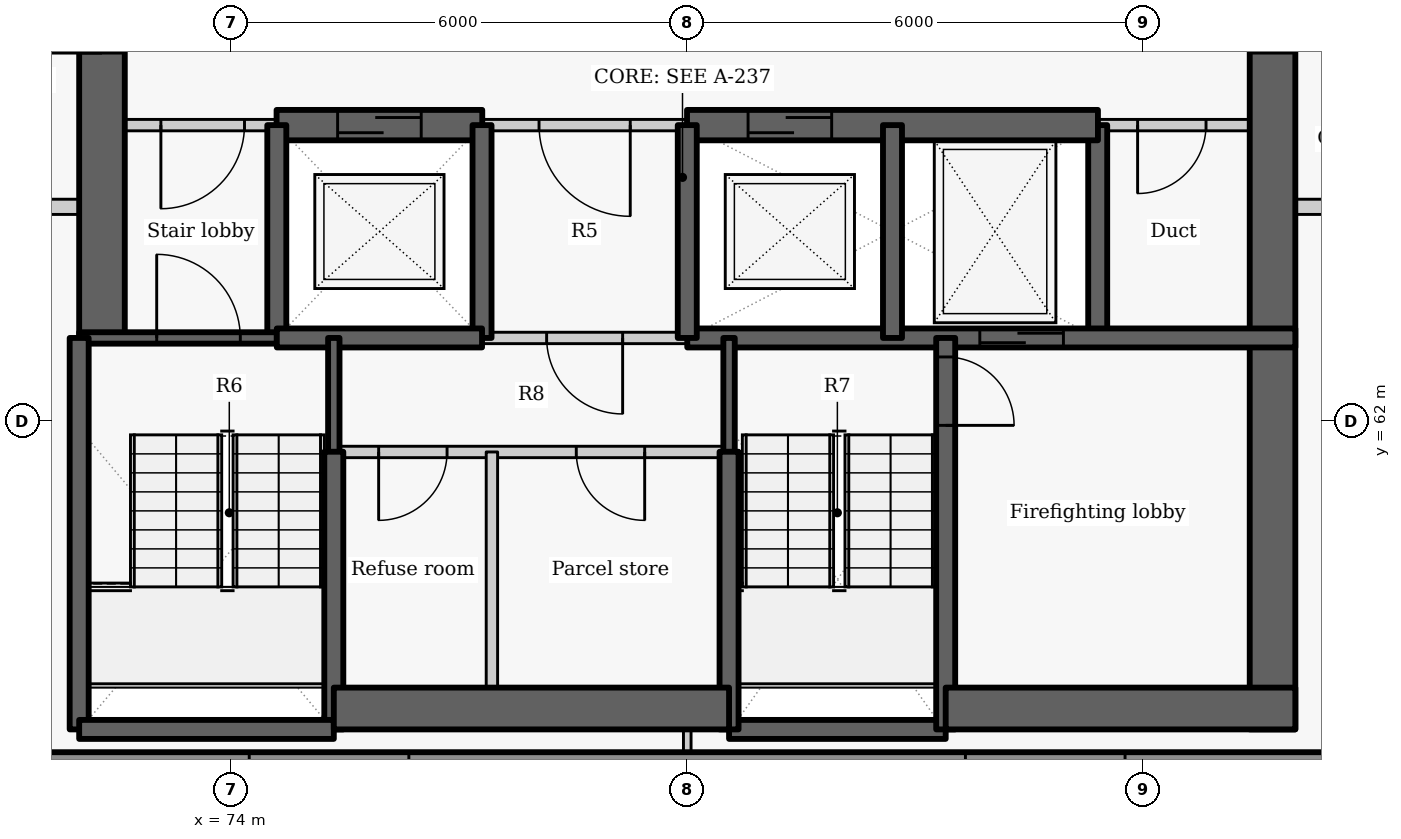
"""IFC4 building model, lengths in metres.
Left out: names, types, materials, properties, quantities, classifications, styles, units other than length and angle.
Written with IfcOpenShell. Run it as: python <this file> out.ifc"""

import sys

from ifc_helpers import new_model, si_unit, direction, frame, frame_2d, origin, place, context, subcontext, project, spatial, rectangle, extrude, element, fill, save


model = new_model("IFC4")
c1 = context("Model", 3, precision=1e-05, world=origin(), true_north=direction((0.0, 1.0)))
c2 = subcontext(c1, "Body", "Model", "MODEL_VIEW")
j1 = project(units=[si_unit("LENGTHUNIT", "METRE"), si_unit("PLANEANGLEUNIT", "RADIAN")], contexts=[c1])
p1 = place(None, origin())
s1 = spatial("IfcSite", under=j1, at=p1, CompositionType="ELEMENT")
p2 = place(p1, origin())
s2 = spatial("IfcBuilding", under=s1, at=p2, CompositionType="ELEMENT")
p3 = place(p2, frame((0.0, 0.0, 216.3)))
s3 = spatial("IfcBuildingStorey", under=s2, at=p3, CompositionType="ELEMENT", Elevation=216.3)
p4 = place(p3, frame((70.551, 57.5, 0.0), z_axis=(0.0, 0.0, 1.0), x_axis=(1.0, 0.0, 0.0)))
e1 = element("IfcWall", 1, at=p4, inside=s3, PredefinedType="SOLIDWALL", context=c2, shape_type="SweptSolid", body=[
    extrude(rectangle(XDim=18.893, YDim=0.3, at=frame_2d((9.446, 0.0))), origin(), (0.0, 0.0, 1.0), 2.05),
])
p5 = place(p4, frame((3.687, 0.0, 0.9)))
e2 = element("IfcOpeningElement", 2, at=p5, cuts=e1, PredefinedType="OPENING", context=c2, shape_type="SweptSolid", body=[
    extrude(rectangle(XDim=2.1, YDim=1.1, at=frame_2d((1.05, 0.55))), frame((0.0, 0.16, 0.0), z_axis=(0.0, -1.0, 0.0), x_axis=(1.0, 0.0, 0.0)), (0.0, 0.0, 1.0), 0.32),
])
p6 = place(p4, frame((13.109, 0.0, 0.9)))
e3 = element("IfcOpeningElement", 3, at=p6, cuts=e1, PredefinedType="OPENING", context=c2, shape_type="SweptSolid", body=[
    extrude(rectangle(XDim=2.1, YDim=1.1, at=frame_2d((1.05, 0.55))), frame((0.0, 0.16, 0.0), z_axis=(0.0, -1.0, 0.0), x_axis=(1.0, 0.0, 0.0)), (0.0, 0.0, 1.0), 0.32),
])
p7 = place(p3, frame((72.3, 63.1, -0.275), z_axis=(0.0, 0.0, 1.0), x_axis=(0.0, 1.0, 0.0)))
e4 = element("IfcWall", 4, at=p7, inside=s3, PredefinedType="SHEAR", context=c2, shape_type="SweptSolid", body=[
    extrude(rectangle(XDim=9.1, YDim=0.6, at=frame_2d((4.55, 0.0))), origin(), (0.0, 0.0, 1.0), 3.225),
])
p8 = place(p7, frame((3.748, 0.0, 0.275)))
e5 = element("IfcOpeningElement", 5, at=p8, cuts=e4, PredefinedType="OPENING", context=c2, shape_type="SweptSolid", body=[
    extrude(rectangle(XDim=1.5, YDim=2.1, at=frame_2d((0.75, 1.05))), frame((0.0, 0.31, 0.0), z_axis=(0.0, -1.0, 0.0), x_axis=(1.0, 0.0, 0.0)), (0.0, 0.0, 1.0), 0.62),
])
p9 = place(p3, frame((85.4, 63.1, -0.275), z_axis=(0.0, 0.0, 1.0), x_axis=(0.0, 1.0, 0.0)))
e6 = element("IfcWall", 6, at=p9, inside=s3, PredefinedType="SHEAR", context=c2, shape_type="SweptSolid", body=[
    extrude(rectangle(XDim=2.8, YDim=0.25, at=frame_2d((1.4, 0.0))), origin(), (0.0, 0.0, 1.0), 3.225),
])
p10 = place(p3, frame((87.7, 72.2, -0.275), z_axis=(0.0, 0.0, 1.0), x_axis=(0.0, -1.0, 0.0)))
e7 = element("IfcWall", 7, at=p10, inside=s3, PredefinedType="SHEAR", context=c2, shape_type="SweptSolid", body=[
    extrude(rectangle(XDim=14.25, YDim=0.6, at=frame_2d((7.125, 0.0))), origin(), (0.0, 0.0, 1.0), 3.225),
])
p11 = place(p10, frame((3.852, 0.0, 0.275)))
e8 = element("IfcOpeningElement", 8, at=p11, cuts=e7, PredefinedType="OPENING", context=c2, shape_type="SweptSolid", body=[
    extrude(rectangle(XDim=1.5, YDim=2.1, at=frame_2d((0.75, 1.05))), frame((0.0, 0.31, 0.0), z_axis=(0.0, -1.0, 0.0), x_axis=(1.0, 0.0, 0.0)), (0.0, 0.0, 1.0), 0.62),
])
p12 = place(p3, frame((74.603, 65.9, 0.0), z_axis=(0.0, 0.0, 1.0), x_axis=(-1.0, 0.0, 0.0)))
e9 = element("IfcWall", 9, at=p12, inside=s3, PredefinedType="PARTITIONING", context=c2, shape_type="SweptSolid", body=[
    extrude(rectangle(XDim=2.603, YDim=0.15, at=frame_2d((1.302, 0.0))), origin(), (0.0, 0.0, 1.0), 2.95),
])
p13 = place(p12, frame((0.428, 0.0, 0.0)))
e10 = element("IfcOpeningElement", 10, at=p13, cuts=e9, PredefinedType="OPENING", context=c2, shape_type="SweptSolid", body=[
    extrude(rectangle(XDim=1.1, YDim=2.1, at=frame_2d((0.55, 1.05))), frame((0.0, 0.085, 0.0), z_axis=(0.0, -1.0, 0.0), x_axis=(1.0, 0.0, 0.0)), (0.0, 0.0, 1.0), 0.17),
])
p14 = place(p3, frame((80.003, 65.9, 0.0), z_axis=(0.0, 0.0, 1.0), x_axis=(-1.0, 0.0, 0.0)))
e11 = element("IfcWall", 11, at=p14, inside=s3, PredefinedType="PARTITIONING", context=c2, shape_type="SweptSolid", body=[
    extrude(rectangle(XDim=2.706, YDim=0.15, at=frame_2d((1.353, 0.0))), origin(), (0.0, 0.0, 1.0), 2.95),
])
p15 = place(p14, frame((0.753, 0.0, 0.0)))
e12 = element("IfcOpeningElement", 12, at=p15, cuts=e11, PredefinedType="OPENING", context=c2, shape_type="SweptSolid", body=[
    extrude(rectangle(XDim=1.2, YDim=2.1, at=frame_2d((0.6, 1.05))), frame((0.0, 0.085, 0.0), z_axis=(0.0, -1.0, 0.0), x_axis=(1.0, 0.0, 0.0)), (0.0, 0.0, 1.0), 0.17),
])
p16 = place(p3, frame((88.0, 65.9, 0.0), z_axis=(0.0, 0.0, 1.0), x_axis=(-1.0, 0.0, 0.0)))
e13 = element("IfcWall", 13, at=p16, inside=s3, PredefinedType="PARTITIONING", context=c2, shape_type="SweptSolid", body=[
    extrude(rectangle(XDim=2.603, YDim=0.15, at=frame_2d((1.302, 0.0))), origin(), (0.0, 0.0, 1.0), 2.95),
])
p17 = place(p16, frame((1.175, 0.0, 0.0)))
e14 = element("IfcOpeningElement", 14, at=p17, cuts=e13, PredefinedType="OPENING", context=c2, shape_type="SweptSolid", body=[
    extrude(rectangle(XDim=0.9, YDim=2.1, at=frame_2d((0.45, 1.05))), frame((0.0, 0.085, 0.0), z_axis=(0.0, -1.0, 0.0), x_axis=(1.0, 0.0, 0.0)), (0.0, 0.0, 1.0), 0.17),
])
p18 = place(p3, frame((74.597, 65.9, -0.275), z_axis=(0.0, 0.0, 1.0), x_axis=(1.0, 0.0, 0.0)))
e15 = element("IfcWall", 15, at=p18, inside=s3, PredefinedType="SHEAR", context=c2, shape_type="SweptSolid", body=[
    extrude(rectangle(XDim=2.706, YDim=0.4, at=frame_2d((1.353, 0.0))), origin(), (0.0, 0.0, 1.0), 3.225),
])
p19 = place(p18, frame((0.803, 0.0, 0.275)))
e16 = element("IfcOpeningElement", 16, at=p19, cuts=e15, PredefinedType="OPENING", context=c2, shape_type="SweptSolid", body=[
    extrude(rectangle(XDim=1.1, YDim=2.1, at=frame_2d((0.55, 1.05))), frame((0.0, 0.21, 0.0), z_axis=(0.0, -1.0, 0.0), x_axis=(1.0, 0.0, 0.0)), (0.0, 0.0, 1.0), 0.42),
])
p20 = place(p3, frame((79.997, 65.9, -0.275), z_axis=(0.0, 0.0, 1.0), x_axis=(1.0, 0.0, 0.0)))
e17 = element("IfcWall", 17, at=p20, inside=s3, PredefinedType="SHEAR", context=c2, shape_type="SweptSolid", body=[
    extrude(rectangle(XDim=5.406, YDim=0.4, at=frame_2d((2.703, 0.0))), origin(), (0.0, 0.0, 1.0), 3.225),
])
p21 = place(p20, frame((0.803, 0.0, 0.275)))
e18 = element("IfcOpeningElement", 18, at=p21, cuts=e17, PredefinedType="OPENING", context=c2, shape_type="SweptSolid", body=[
    extrude(rectangle(XDim=1.1, YDim=2.1, at=frame_2d((0.55, 1.05))), frame((0.0, 0.21, 0.0), z_axis=(0.0, -1.0, 0.0), x_axis=(1.0, 0.0, 0.0)), (0.0, 0.0, 1.0), 0.42),
])
p22 = place(p3, frame((74.6, 63.1, -0.275), z_axis=(0.0, 0.0, 1.0), x_axis=(0.0, 1.0, 0.0)))
e19 = element("IfcWall", 19, at=p22, inside=s3, PredefinedType="SHEAR", context=c2, shape_type="SweptSolid", body=[
    extrude(rectangle(XDim=2.8, YDim=0.25, at=frame_2d((1.4, 0.0))), origin(), (0.0, 0.0, 1.0), 3.225),
])
p23 = place(p3, frame((72.0, 63.1, -0.275), z_axis=(0.0, 0.0, 1.0), x_axis=(1.0, 0.0, 0.0)))
e20 = element("IfcWall", 20, at=p23, inside=s3, PredefinedType="SHEAR", context=c2, shape_type="SweptSolid", body=[
    extrude(rectangle(XDim=2.6, YDim=0.15, at=frame_2d((1.3, 0.0))), origin(), (0.0, 0.0, 1.0), 3.225),
])
p24 = place(p23, frame((1.02, 0.0, 0.275)))
e21 = element("IfcOpeningElement", 21, at=p24, cuts=e20, PredefinedType="OPENING", context=c2, shape_type="SweptSolid", body=[
    extrude(rectangle(XDim=1.1, YDim=2.1, at=frame_2d((0.55, 1.05))), frame((0.0, 0.085, 0.0), z_axis=(0.0, -1.0, 0.0), x_axis=(1.0, 0.0, 0.0)), (0.0, 0.0, 1.0), 0.17),
])
p25 = place(p3, frame((77.3, 63.1, -0.275), z_axis=(0.0, 0.0, 1.0), x_axis=(0.0, 1.0, 0.0)))
e22 = element("IfcWall", 22, at=p25, inside=s3, PredefinedType="SHEAR", context=c2, shape_type="SweptSolid", body=[
    extrude(rectangle(XDim=2.8, YDim=0.25, at=frame_2d((1.4, 0.0))), origin(), (0.0, 0.0, 1.0), 3.225),
])
p26 = place(p3, frame((74.6, 63.1, -0.275), z_axis=(0.0, 0.0, 1.0), x_axis=(1.0, 0.0, 0.0)))
e23 = element("IfcWall", 23, at=p26, inside=s3, PredefinedType="SHEAR", context=c2, shape_type="SweptSolid", body=[
    extrude(rectangle(XDim=2.7, YDim=0.25, at=frame_2d((1.35, 0.0))), origin(), (0.0, 0.0, 1.0), 3.225),
])
p27 = place(p3, frame((80.0, 63.1, -0.275), z_axis=(0.0, 0.0, 1.0), x_axis=(1.0, 0.0, 0.0)))
e24 = element("IfcWall", 24, at=p27, inside=s3, PredefinedType="SHEAR", context=c2, shape_type="SweptSolid", body=[
    extrude(rectangle(XDim=8.0, YDim=0.25, at=frame_2d((4.0, 0.0))), origin(), (0.0, 0.0, 1.0), 3.225),
])
p28 = place(p27, frame((3.849, 0.0, 0.275)))
e25 = element("IfcOpeningElement", 25, at=p28, cuts=e24, PredefinedType="OPENING", context=c2, shape_type="SweptSolid", body=[
    extrude(rectangle(XDim=1.1, YDim=2.1, at=frame_2d((0.55, 1.05))), frame((0.0, 0.135, 0.0), z_axis=(0.0, -1.0, 0.0), x_axis=(1.0, 0.0, 0.0)), (0.0, 0.0, 1.0), 0.27),
])
p29 = place(p3, frame((80.0, 63.1, -0.275), z_axis=(0.0, 0.0, 1.0), x_axis=(0.0, 1.0, 0.0)))
e26 = element("IfcWall", 26, at=p29, inside=s3, PredefinedType="SHEAR", context=c2, shape_type="SweptSolid", body=[
    extrude(rectangle(XDim=2.8, YDim=0.25, at=frame_2d((1.4, 0.0))), origin(), (0.0, 0.0, 1.0), 3.225),
])
p30 = place(p3, frame((80.0, 63.1, 0.0), z_axis=(0.0, 0.0, 1.0), x_axis=(-1.0, 0.0, 0.0)))
e27 = element("IfcWall", 27, at=p30, inside=s3, PredefinedType="PARTITIONING", context=c2, shape_type="SweptSolid", body=[
    extrude(rectangle(XDim=2.7, YDim=0.15, at=frame_2d((1.35, 0.0))), origin(), (0.0, 0.0, 1.0), 2.95),
])
p31 = place(p30, frame((0.85, 0.0, 0.0)))
e28 = element("IfcOpeningElement", 28, at=p31, cuts=e27, PredefinedType="OPENING", context=c2, shape_type="SweptSolid", body=[
    extrude(rectangle(XDim=1.0, YDim=2.1, at=frame_2d((0.5, 1.05))), frame((0.0, 0.085, 0.0), z_axis=(0.0, -1.0, 0.0), x_axis=(1.0, 0.0, 0.0)), (0.0, 0.0, 1.0), 0.17),
])
p32 = place(p3, frame((82.7, 63.1, -0.275), z_axis=(0.0, 0.0, 1.0), x_axis=(0.0, 1.0, 0.0)))
e29 = element("IfcWall", 29, at=p32, inside=s3, PredefinedType="SHEAR", context=c2, shape_type="SweptSolid", body=[
    extrude(rectangle(XDim=2.8, YDim=0.25, at=frame_2d((1.4, 0.0))), origin(), (0.0, 0.0, 1.0), 3.225),
])
p33 = place(p3, frame((75.35, 61.597, -0.275), z_axis=(0.0, 0.0, 1.0), x_axis=(0.0, 1.0, 0.0)))
e30 = element("IfcWall", 30, at=p33, inside=s3, PredefinedType="SHEAR", context=c2, shape_type="SweptSolid", body=[
    extrude(rectangle(XDim=1.503, YDim=0.15, at=frame_2d((0.751, 0.0))), origin(), (0.0, 0.0, 1.0), 3.225),
])
p34 = place(p3, frame((75.35, 57.95, -0.275), z_axis=(0.0, 0.0, 1.0), x_axis=(0.0, 1.0, 0.0)))
e31 = element("IfcWall", 31, at=p34, inside=s3, PredefinedType="SHEAR", context=c2, shape_type="SweptSolid", body=[
    extrude(rectangle(XDim=3.653, YDim=0.25, at=frame_2d((1.827, 0.0))), origin(), (0.0, 0.0, 1.0), 3.225),
])
p35 = place(p3, frame((72.0, 57.95, -0.275), z_axis=(0.0, 0.0, 1.0), x_axis=(0.0, 1.0, 0.0)))
e32 = element("IfcWall", 32, at=p35, inside=s3, PredefinedType="SHEAR", context=c2, shape_type="SweptSolid", body=[
    extrude(rectangle(XDim=5.15, YDim=0.25, at=frame_2d((2.575, 0.0))), origin(), (0.0, 0.0, 1.0), 3.225),
])
p36 = place(p3, frame((72.0, 57.95, -0.275), z_axis=(0.0, 0.0, 1.0), x_axis=(1.0, 0.0, 0.0)))
e33 = element("IfcWall", 33, at=p36, inside=s3, PredefinedType="SHEAR", context=c2, shape_type="SweptSolid", body=[
    extrude(rectangle(XDim=3.35, YDim=0.25, at=frame_2d((1.675, 0.0))), origin(), (0.0, 0.0, 1.0), 3.225),
])
p37 = place(p3, frame((80.55, 57.95, -0.275), z_axis=(0.0, 0.0, 1.0), x_axis=(1.0, 0.0, 0.0)))
e34 = element("IfcWall", 34, at=p37, inside=s3, PredefinedType="SHEAR", context=c2, shape_type="SweptSolid", body=[
    extrude(rectangle(XDim=2.85, YDim=0.25, at=frame_2d((1.425, 0.0))), origin(), (0.0, 0.0, 1.0), 3.225),
])
p38 = place(p3, frame((83.4, 63.1, -0.275), z_axis=(0.0, 0.0, 1.0), x_axis=(0.0, -1.0, 0.0)))
e35 = element("IfcWall", 35, at=p38, inside=s3, PredefinedType="SHEAR", context=c2, shape_type="SweptSolid", body=[
    extrude(rectangle(XDim=5.15, YDim=0.25, at=frame_2d((2.575, 0.0))), origin(), (0.0, 0.0, 1.0), 3.225),
])
p39 = place(p38, frame((0.25, 0.0, 0.275)))
e36 = element("IfcOpeningElement", 36, at=p39, cuts=e35, PredefinedType="OPENING", context=c2, shape_type="SweptSolid", body=[
    extrude(rectangle(XDim=0.9, YDim=2.1, at=frame_2d((0.45, 1.05))), frame((0.0, 0.135, 0.0), z_axis=(0.0, -1.0, 0.0), x_axis=(1.0, 0.0, 0.0)), (0.0, 0.0, 1.0), 0.27),
])
p40 = place(p3, frame((80.55, 61.597, -0.275), z_axis=(0.0, 0.0, 1.0), x_axis=(0.0, 1.0, 0.0)))
e37 = element("IfcWall", 37, at=p40, inside=s3, PredefinedType="SHEAR", context=c2, shape_type="SweptSolid", body=[
    extrude(rectangle(XDim=1.503, YDim=0.15, at=frame_2d((0.751, 0.0))), origin(), (0.0, 0.0, 1.0), 3.225),
])
p41 = place(p3, frame((80.55, 57.95, -0.275), z_axis=(0.0, 0.0, 1.0), x_axis=(0.0, 1.0, 0.0)))
e38 = element("IfcWall", 38, at=p41, inside=s3, PredefinedType="SHEAR", context=c2, shape_type="SweptSolid", body=[
    extrude(rectangle(XDim=3.653, YDim=0.25, at=frame_2d((1.827, 0.0))), origin(), (0.0, 0.0, 1.0), 3.225),
])
p42 = place(p3, frame((75.35, 58.225, -0.275), z_axis=(0.0, 0.0, 1.0), x_axis=(1.0, 0.0, 0.0)))
e39 = element("IfcWall", 39, at=p42, inside=s3, PredefinedType="SHEAR", context=c2, shape_type="SweptSolid", body=[
    extrude(rectangle(XDim=5.2, YDim=0.55, at=frame_2d((2.6, 0.0))), origin(), (0.0, 0.0, 1.0), 3.225),
])
p43 = place(p3, frame((83.4, 58.225, -0.275), z_axis=(0.0, 0.0, 1.0), x_axis=(1.0, 0.0, 0.0)))
e40 = element("IfcWall", 40, at=p43, inside=s3, PredefinedType="SHEAR", context=c2, shape_type="SweptSolid", body=[
    extrude(rectangle(XDim=4.6, YDim=0.55, at=frame_2d((2.3, 0.0))), origin(), (0.0, 0.0, 1.0), 3.225),
])
p44 = place(p3, frame((80.55, 61.6, 0.0), z_axis=(0.0, 0.0, 1.0), x_axis=(-1.0, 0.0, 0.0)))
e41 = element("IfcWall", 41, at=p44, inside=s3, PredefinedType="PARTITIONING", context=c2, shape_type="SweptSolid", body=[
    extrude(rectangle(XDim=5.2, YDim=0.15, at=frame_2d((2.6, 0.0))), origin(), (0.0, 0.0, 1.0), 2.95),
])
p45 = place(p44, frame((3.71, 0.0, 0.0)))
e42 = element("IfcOpeningElement", 42, at=p45, cuts=e41, PredefinedType="OPENING", context=c2, shape_type="SweptSolid", body=[
    extrude(rectangle(XDim=0.9, YDim=2.1, at=frame_2d((0.45, 1.05))), frame((0.0, 0.085, 0.0), z_axis=(0.0, -1.0, 0.0), x_axis=(1.0, 0.0, 0.0)), (0.0, 0.0, 1.0), 0.17),
])
p46 = place(p44, frame((1.11, 0.0, 0.0)))
e43 = element("IfcOpeningElement", 43, at=p46, cuts=e41, PredefinedType="OPENING", context=c2, shape_type="SweptSolid", body=[
    extrude(rectangle(XDim=0.9, YDim=2.1, at=frame_2d((0.45, 1.05))), frame((0.0, 0.085, 0.0), z_axis=(0.0, -1.0, 0.0), x_axis=(1.0, 0.0, 0.0)), (0.0, 0.0, 1.0), 0.17),
])
p47 = place(p3, frame((77.43, 57.95, 0.0), z_axis=(0.0, 0.0, 1.0), x_axis=(0.0, 1.0, 0.0)))
e44 = element("IfcWall", 44, at=p47, inside=s3, PredefinedType="PARTITIONING", context=c2, shape_type="SweptSolid", body=[
    extrude(rectangle(XDim=3.65, YDim=0.15, at=frame_2d((1.825, 0.0))), origin(), (0.0, 0.0, 1.0), 2.95),
])
p48 = place(p3, frame((70.527, 64.825, 0.0), z_axis=(0.0, 0.0, 1.0), x_axis=(1.0, 0.0, 0.0)))
e45 = element("IfcWall", 45, at=p48, inside=s3, PredefinedType="PARTITIONING", context=c2, shape_type="SweptSolid", body=[
    extrude(rectangle(XDim=1.473, YDim=0.2, at=frame_2d((0.736, 0.0))), origin(), (0.0, 0.0, 1.0), 2.95),
])
p49 = place(p3, frame((88.0, 64.825, 0.0), z_axis=(0.0, 0.0, 1.0), x_axis=(1.0, 0.0, 0.0)))
e46 = element("IfcWall", 46, at=p49, inside=s3, PredefinedType="PARTITIONING", context=c2, shape_type="SweptSolid", body=[
    extrude(rectangle(XDim=2.413, YDim=0.2, at=frame_2d((1.207, 0.0))), origin(), (0.0, 0.0, 1.0), 2.43),
])
p50 = place(p3, frame((80.0, 57.65, 0.0), z_axis=(0.0, 0.0, 1.0), x_axis=(0.0, 1.0, 0.0)))
e47 = element("IfcWall", 47, at=p50, inside=s3, PredefinedType="PARTITIONING", context=c2, shape_type="SweptSolid", body=[
    extrude(rectangle(XDim=0.3, YDim=0.1, at=frame_2d((0.15, 0.0))), origin(), (0.0, 0.0, 1.0), 2.95),
])
p51 = place(p13, origin())
e48 = element("IfcDoor", 48, at=p51, inside=s3, OperationType="SINGLE_SWING_RIGHT", PredefinedType="DOOR", context=c2, shape_type="SweptSolid", body=[
    extrude(rectangle(XDim=1.1, YDim=2.1, at=frame_2d((0.55, 1.05))), frame((0.0, 0.025, 0.0), z_axis=(0.0, -1.0, 0.0), x_axis=(1.0, 0.0, 0.0)), (0.0, 0.0, 1.0), 0.05),
])
fill(e10, e48)
p52 = place(p19, origin())
e49 = element("IfcDoor", 49, at=p52, inside=s3, OperationType="SLIDING_TO_LEFT", PredefinedType="DOOR", context=c2, shape_type="SweptSolid", body=[
    extrude(rectangle(XDim=1.1, YDim=2.1, at=frame_2d((0.55, 1.05))), frame((0.0, 0.025, 0.0), z_axis=(0.0, -1.0, 0.0), x_axis=(1.0, 0.0, 0.0)), (0.0, 0.0, 1.0), 0.05),
])
fill(e16, e49)
p53 = place(p15, origin())
e50 = element("IfcDoor", 50, at=p53, inside=s3, OperationType="DOUBLE_DOOR_SINGLE_SWING", PredefinedType="DOOR", context=c2, shape_type="SweptSolid", body=[
    extrude(rectangle(XDim=1.2, YDim=2.1, at=frame_2d((0.6, 1.05))), frame((0.0, 0.025, 0.0), z_axis=(0.0, -1.0, 0.0), x_axis=(1.0, 0.0, 0.0)), (0.0, 0.0, 1.0), 0.05),
])
fill(e12, e50)
p54 = place(p21, origin())
e51 = element("IfcDoor", 51, at=p54, inside=s3, OperationType="SLIDING_TO_LEFT", PredefinedType="DOOR", context=c2, shape_type="SweptSolid", body=[
    extrude(rectangle(XDim=1.1, YDim=2.1, at=frame_2d((0.55, 1.05))), frame((0.0, 0.025, 0.0), z_axis=(0.0, -1.0, 0.0), x_axis=(1.0, 0.0, 0.0)), (0.0, 0.0, 1.0), 0.05),
])
fill(e18, e51)
p55 = place(p28, origin())
e52 = element("IfcDoor", 52, at=p55, inside=s3, OperationType="SLIDING_TO_LEFT", PredefinedType="DOOR", context=c2, shape_type="SweptSolid", body=[
    extrude(rectangle(XDim=1.1, YDim=2.1, at=frame_2d((0.55, 1.05))), frame((0.0, 0.025, 0.0), z_axis=(0.0, -1.0, 0.0), x_axis=(1.0, 0.0, 0.0)), (0.0, 0.0, 1.0), 0.05),
])
fill(e25, e52)
p56 = place(p17, origin())
e53 = element("IfcDoor", 53, at=p56, inside=s3, OperationType="SINGLE_SWING_RIGHT", PredefinedType="DOOR", context=c2, shape_type="SweptSolid", body=[
    extrude(rectangle(XDim=0.9, YDim=2.1, at=frame_2d((0.45, 1.05))), frame((0.0, 0.025, 0.0), z_axis=(0.0, -1.0, 0.0), x_axis=(1.0, 0.0, 0.0)), (0.0, 0.0, 1.0), 0.05),
])
fill(e14, e53)
p57 = place(p31, origin())
e54 = element("IfcDoor", 54, at=p57, inside=s3, OperationType="SINGLE_SWING_LEFT", PredefinedType="DOOR", context=c2, shape_type="SweptSolid", body=[
    extrude(rectangle(XDim=1.0, YDim=2.1, at=frame_2d((0.5, 1.05))), frame((0.0, 0.025, 0.0), z_axis=(0.0, -1.0, 0.0), x_axis=(1.0, 0.0, 0.0)), (0.0, 0.0, 1.0), 0.05),
])
fill(e28, e54)
p58 = place(p45, origin())
e55 = element("IfcDoor", 55, at=p58, inside=s3, OperationType="SINGLE_SWING_RIGHT", PredefinedType="DOOR", context=c2, shape_type="SweptSolid", body=[
    extrude(rectangle(XDim=0.9, YDim=2.1, at=frame_2d((0.45, 1.05))), frame((0.0, 0.025, 0.0), z_axis=(0.0, -1.0, 0.0), x_axis=(1.0, 0.0, 0.0)), (0.0, 0.0, 1.0), 0.05),
])
fill(e42, e55)
p59 = place(p46, origin())
e56 = element("IfcDoor", 56, at=p59, inside=s3, OperationType="SINGLE_SWING_LEFT", PredefinedType="DOOR", context=c2, shape_type="SweptSolid", body=[
    extrude(rectangle(XDim=0.9, YDim=2.1, at=frame_2d((0.45, 1.05))), frame((0.0, 0.025, 0.0), z_axis=(0.0, -1.0, 0.0), x_axis=(1.0, 0.0, 0.0)), (0.0, 0.0, 1.0), 0.05),
])
fill(e43, e56)
p60 = place(p24, origin())
e57 = element("IfcDoor", 57, at=p60, inside=s3, OperationType="SINGLE_SWING_LEFT", PredefinedType="DOOR", context=c2, shape_type="SweptSolid", body=[
    extrude(rectangle(XDim=1.1, YDim=2.1, at=frame_2d((0.55, 1.05))), frame((0.0, 0.025, 0.0), z_axis=(0.0, -1.0, 0.0), x_axis=(1.0, 0.0, 0.0)), (0.0, 0.0, 1.0), 0.05),
])
fill(e21, e57)
p61 = place(p39, origin())
e58 = element("IfcDoor", 58, at=p61, inside=s3, OperationType="SINGLE_SWING_RIGHT", PredefinedType="DOOR", context=c2, shape_type="SweptSolid", body=[
    extrude(rectangle(XDim=0.9, YDim=2.1, at=frame_2d((0.45, 1.05))), frame((0.0, 0.025, 0.0), z_axis=(0.0, -1.0, 0.0), x_axis=(1.0, 0.0, 0.0)), (0.0, 0.0, 1.0), 0.05),
])
fill(e36, e58)
p62 = place(p11, origin())
e59 = element("IfcDoor", 59, at=p62, inside=s3, OperationType="DOUBLE_DOOR_SINGLE_SWING", PredefinedType="DOOR", context=c2, shape_type="SweptSolid", body=[
    extrude(rectangle(XDim=1.5, YDim=2.1, at=frame_2d((0.75, 1.05))), frame((0.0, 0.025, 0.0), z_axis=(0.0, -1.0, 0.0), x_axis=(1.0, 0.0, 0.0)), (0.0, 0.0, 1.0), 0.05),
])
fill(e8, e59)
p63 = place(p8, origin())
e60 = element("IfcDoor", 60, at=p63, inside=s3, OperationType="DOUBLE_DOOR_SINGLE_SWING", PredefinedType="DOOR", context=c2, shape_type="SweptSolid", body=[
    extrude(rectangle(XDim=1.5, YDim=2.1, at=frame_2d((0.75, 1.05))), frame((0.0, 0.025, 0.0), z_axis=(0.0, -1.0, 0.0), x_axis=(1.0, 0.0, 0.0)), (0.0, 0.0, 1.0), 0.05),
])
fill(e5, e60)
save(model, sys.argv[1])
